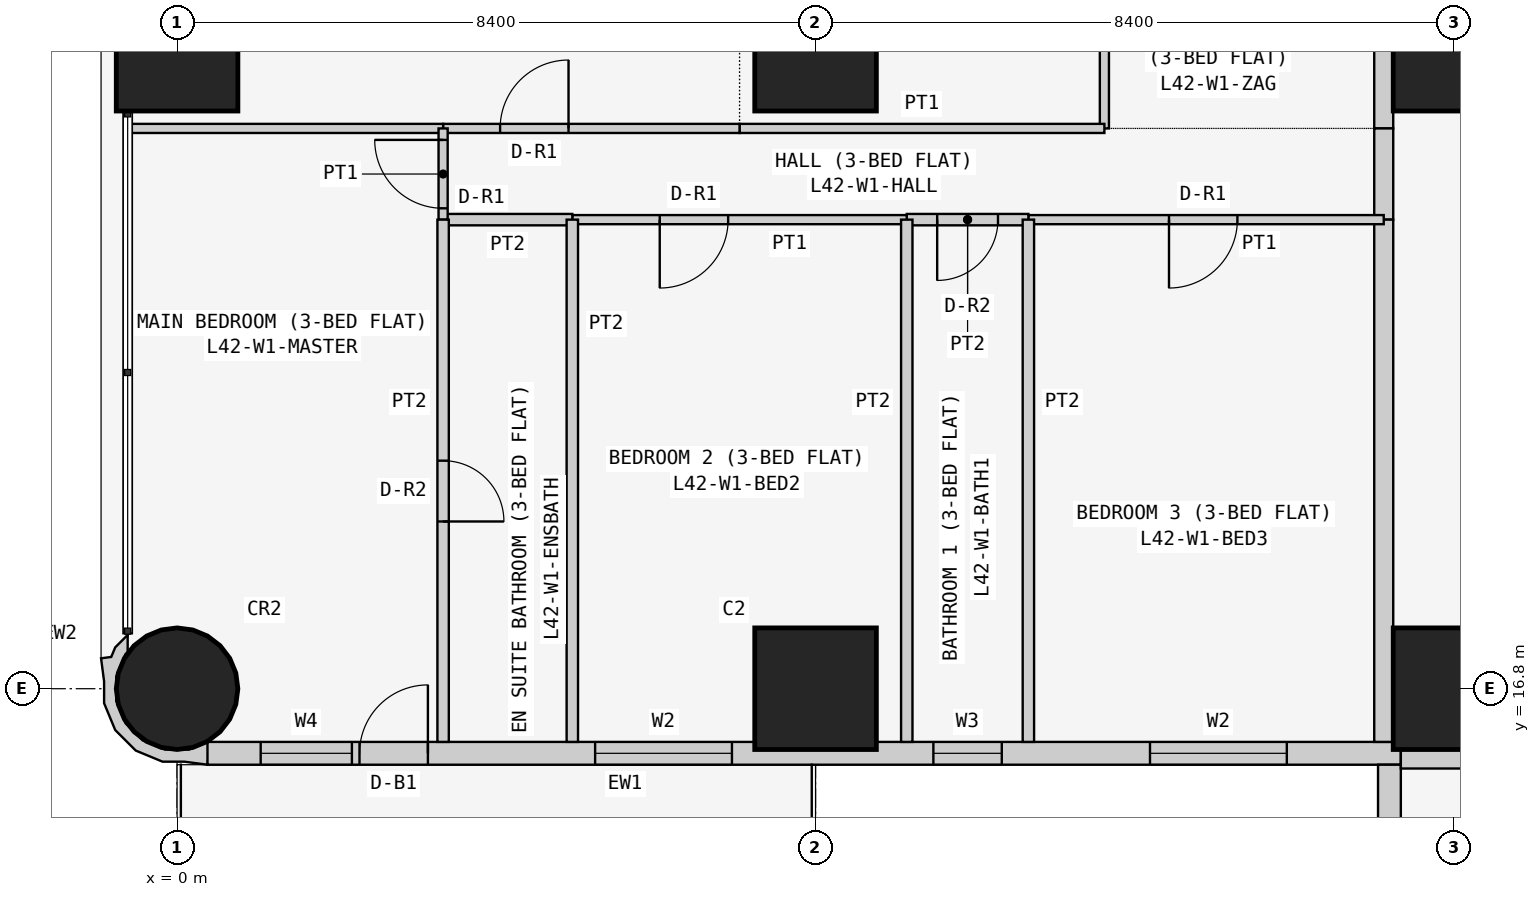
"""IFC4 building model, lengths in metres.
Left out: names, types, materials, properties, quantities, classifications, styles, units other than length and angle.
Written with IfcOpenShell. Run it as: python <this file> out.ifc"""

import sys

from ifc_helpers import new_model, si_unit, direction, frame, frame_2d, origin, origin_2d, place, context, subcontext, project, spatial, polyline, rectangle, circle, outline, extrude, element, fill, save


model = new_model("IFC4")
c1 = context("Model", 3, precision=1e-05, world=origin(), true_north=direction((0.0, 1.0)))
c2 = subcontext(c1, "Body", "Model", "MODEL_VIEW")
j1 = project(units=[si_unit("LENGTHUNIT", "METRE"), si_unit("PLANEANGLEUNIT", "RADIAN")], contexts=[c1])
p1 = place(None, origin())
s1 = spatial("IfcSite", under=j1, at=p1, CompositionType="ELEMENT")
p2 = place(p1, origin())
s2 = spatial("IfcBuilding", under=s1, at=p2, CompositionType="ELEMENT")
p3 = place(p2, frame((0.0, 0.0, 162.9)))
s3 = spatial("IfcBuildingStorey", under=s2, at=p3, CompositionType="ELEMENT", Elevation=162.9)
p4 = place(p3, frame((0.0, 16.8, 0.0), z_axis=(0.0, 0.0, 1.0), x_axis=(1.0, 0.0, 0.0)))
e1 = element("IfcColumn", 1, at=p4, inside=s3, PredefinedType="COLUMN", context=c2, shape_type="SweptSolid", body=[
    extrude(circle(Radius=0.8, at=origin_2d()), origin(), (0.0, 0.0, 1.0), 3.6),
])
for number, where, z_axis, x_axis in (
    (2, (0.0, 25.2, 0.0), (0.0, 0.0, 1.0), (1.0, 0.0, 0.0)),
    (3, (8.4, 16.8, 0.0), (0.0, 0.0, 1.0), (1.0, 0.0, 0.0)),
    (4, (8.4, 25.2, 0.0), (0.0, 0.0, 1.0), (1.0, 0.0, 0.0)),
    (5, (16.8, 16.8, 0.0), (0.0, 0.0, 1.0), (1.0, 0.0, 0.0)),
    (6, (16.8, 25.2, 0.0), (0.0, 0.0, 1.0), (1.0, 0.0, 0.0)),
):
    element("IfcColumn", number, at=place(p3, frame(where, z_axis=z_axis, x_axis=x_axis)), inside=s3, PredefinedType="COLUMN", context=c2, shape_type="SweptSolid", body=[
        extrude(rectangle(XDim=1.6, YDim=1.6, at=origin_2d()), origin(), (0.0, 0.0, 1.0), 3.6),
    ])
p5 = place(p3, frame((0.4, 15.95, 0.0), z_axis=(0.0, 0.0, 1.0), x_axis=(1.0, 0.0, 0.0)))
e7 = element("IfcWall", 7, at=p5, inside=s3, PredefinedType="SOLIDWALL", context=c2, shape_type="SweptSolid", body=[
    extrude(rectangle(XDim=15.7, YDim=0.3, at=frame_2d((7.85, 0.0))), origin(), (0.0, 0.0, 1.0), 3.45),
])
p6 = place(p5, frame((12.4, 0.0, 0.9)))
e8 = element("IfcOpeningElement", 8, at=p6, cuts=e7, PredefinedType="OPENING", context=c2, shape_type="SweptSolid", body=[
    extrude(rectangle(XDim=1.8, YDim=1.5, at=frame_2d((0.9, 0.75))), frame((0.0, 0.16, 0.0), z_axis=(0.0, -1.0, 0.0), x_axis=(1.0, 0.0, 0.0)), (0.0, 0.0, 1.0), 0.32),
])
p7 = place(p5, frame((9.55, 0.0, 1.5)))
e9 = element("IfcOpeningElement", 9, at=p7, cuts=e7, PredefinedType="OPENING", context=c2, shape_type="SweptSolid", body=[
    extrude(rectangle(XDim=0.9, YDim=0.7, at=frame_2d((0.45, 0.35))), frame((0.0, 0.16, 0.0), z_axis=(0.0, -1.0, 0.0), x_axis=(1.0, 0.0, 0.0)), (0.0, 0.0, 1.0), 0.32),
])
p8 = place(p5, frame((5.1, 0.0, 0.9)))
e10 = element("IfcOpeningElement", 10, at=p8, cuts=e7, PredefinedType="OPENING", context=c2, shape_type="SweptSolid", body=[
    extrude(rectangle(XDim=1.8, YDim=1.5, at=frame_2d((0.9, 0.75))), frame((0.0, 0.16, 0.0), z_axis=(0.0, -1.0, 0.0), x_axis=(1.0, 0.0, 0.0)), (0.0, 0.0, 1.0), 0.32),
])
p9 = place(p5, frame((2.0, 0.0, 0.0)))
e11 = element("IfcOpeningElement", 11, at=p9, cuts=e7, PredefinedType="OPENING", context=c2, shape_type="SweptSolid", body=[
    extrude(rectangle(XDim=0.9, YDim=2.4, at=frame_2d((0.45, 1.2))), frame((0.0, 0.16, 0.0), z_axis=(0.0, -1.0, 0.0), x_axis=(1.0, 0.0, 0.0)), (0.0, 0.0, 1.0), 0.32),
])
p10 = place(p5, frame((0.7, 0.0, 0.9)))
e12 = element("IfcOpeningElement", 12, at=p10, cuts=e7, PredefinedType="OPENING", context=c2, shape_type="SweptSolid", body=[
    extrude(rectangle(XDim=1.2, YDim=1.5, at=frame_2d((0.6, 0.75))), frame((0.0, 0.16, 0.0), z_axis=(0.0, -1.0, 0.0), x_axis=(1.0, 0.0, 0.0)), (0.0, 0.0, 1.0), 0.32),
])
p11 = place(p3, frame((15.95, 15.8, 0.0), z_axis=(0.0, 0.0, 1.0), x_axis=(0.0, -1.0, 0.0)))
e13 = element("IfcWall", 13, at=p11, inside=s3, PredefinedType="SOLIDWALL", context=c2, shape_type="SweptSolid", body=[
    extrude(rectangle(XDim=7.0, YDim=0.3, at=frame_2d((3.5, 0.0))), origin(), (0.0, 0.0, 1.0), 3.45),
])
p12 = place(p11, frame((1.5, 0.0, 0.9)))
e14 = element("IfcOpeningElement", 14, at=p12, cuts=e13, PredefinedType="OPENING", context=c2, shape_type="SweptSolid", body=[
    extrude(rectangle(XDim=2.4, YDim=1.5, at=frame_2d((1.2, 0.75))), frame((0.0, 0.16, 0.0), z_axis=(0.0, -1.0, 0.0), x_axis=(1.0, 0.0, 0.0)), (0.0, 0.0, 1.0), 0.32),
])
p13 = place(p11, frame((5.05, 0.0, 0.9)))
e15 = element("IfcOpeningElement", 15, at=p13, cuts=e13, PredefinedType="OPENING", context=c2, shape_type="SweptSolid", body=[
    extrude(rectangle(XDim=1.2, YDim=1.5, at=frame_2d((0.6, 0.75))), frame((0.0, 0.16, 0.0), z_axis=(0.0, -1.0, 0.0), x_axis=(1.0, 0.0, 0.0)), (0.0, 0.0, 1.0), 0.32),
])
p14 = place(p3, frame((-0.595, 17.448, 0.0), z_axis=(0.0, 0.0, 1.0), x_axis=(-0.93923434088, -0.343276641956, 0.0)))
e16 = element("IfcWall", 16, at=p14, inside=s3, PredefinedType="SOLIDWALL", context=c2, shape_type="SweptSolid", body=[
    extrude(outline(polyline([(-0.369, 1.89), (-0.509, 1.621), (-0.491, 1.614), (-0.479, 1.609), (-0.211, 1.62), (0.088, 1.511), (0.323, 1.295), (0.457, 1.006), (0.47, 0.688), (0.361, 0.389), (0.146, 0.154), (0.108, 0.137), (0.031, -0.075), (0.241, 0.023), (0.334, 0.124), (0.465, 0.094), (0.532, 0.393), (0.631, 0.663), (0.614, 1.045), (0.453, 1.391), (0.172, 1.649), (-0.098, 1.748), (-0.369, 1.89)])), origin(), (0.0, 0.0, 1.0), 3.45),
])
p15 = place(p3, frame((22.571, 15.875, 0.0), z_axis=(0.0, 0.0, 1.0), x_axis=(-1.0, 0.0, 0.0)))
e17 = element("IfcWall", 17, at=p15, inside=s3, PredefinedType="PARTITIONING", context=c2, shape_type="SweptSolid", body=[
    extrude(rectangle(XDim=6.471, YDim=0.25, at=frame_2d((3.235, 0.0))), origin(), (0.0, 0.0, 1.0), 3.45),
])
p16 = place(p3, frame((15.875, 24.171, 0.0), z_axis=(0.0, 0.0, 1.0), x_axis=(0.0, 1.0, 0.0)))
e18 = element("IfcWall", 18, at=p16, inside=s3, PredefinedType="PARTITIONING", context=c2, shape_type="SweptSolid", body=[
    extrude(rectangle(XDim=5.229, YDim=0.25, at=frame_2d((2.615, 0.0))), origin(), (0.0, 0.0, 1.0), 3.45),
])
p17 = place(p16, frame((2.129, 0.0, 0.0)))
e19 = element("IfcOpeningElement", 19, at=p17, cuts=e18, PredefinedType="OPENING", context=c2, shape_type="SweptSolid", body=[
    extrude(rectangle(XDim=1.0, YDim=2.1, at=frame_2d((0.5, 1.05))), frame((0.0, 0.135, 0.0), z_axis=(0.0, -1.0, 0.0), x_axis=(1.0, 0.0, 0.0)), (0.0, 0.0, 1.0), 0.27),
])
p18 = place(p3, frame((15.875, 22.971, 0.0), z_axis=(0.0, 0.0, 1.0), x_axis=(0.0, 1.0, 0.0)))
e20 = element("IfcWall", 20, at=p18, inside=s3, PredefinedType="PARTITIONING", context=c2, shape_type="SweptSolid", body=[
    extrude(rectangle(XDim=1.2, YDim=0.25, at=frame_2d((0.6, 0.0))), origin(), (0.0, 0.0, 1.0), 3.45),
])
p19 = place(p3, frame((15.875, 16.1, 0.0), z_axis=(0.0, 0.0, 1.0), x_axis=(0.0, 1.0, 0.0)))
e21 = element("IfcWall", 21, at=p19, inside=s3, PredefinedType="PARTITIONING", context=c2, shape_type="SweptSolid", body=[
    extrude(rectangle(XDim=6.871, YDim=0.25, at=frame_2d((3.436, 0.0))), origin(), (0.0, 0.0, 1.0), 3.45),
])
p20 = place(p3, frame((12.2, 29.4, 0.0), z_axis=(0.0, 0.0, 1.0), x_axis=(0.0, -1.0, 0.0)))
e22 = element("IfcWall", 22, at=p20, inside=s3, PredefinedType="PARTITIONING", context=c2, shape_type="SweptSolid", body=[
    extrude(rectangle(XDim=5.229, YDim=0.12, at=frame_2d((2.615, 0.0))), origin(), (0.0, 0.0, 1.0), 3.45),
])
p21 = place(p20, frame((1.05, 0.0, 0.0)))
e23 = element("IfcOpeningElement", 23, at=p21, cuts=e22, PredefinedType="OPENING", context=c2, shape_type="SweptSolid", body=[
    extrude(rectangle(XDim=0.9, YDim=2.1, at=frame_2d((0.45, 1.05))), frame((0.0, 0.07, 0.0), z_axis=(0.0, -1.0, 0.0), x_axis=(1.0, 0.0, 0.0)), (0.0, 0.0, 1.0), 0.14),
])
p22 = place(p3, frame((7.4, 24.171, 0.0), z_axis=(0.0, 0.0, 1.0), x_axis=(1.0, 0.0, 0.0)))
e24 = element("IfcWall", 24, at=p22, inside=s3, PredefinedType="PARTITIONING", context=c2, shape_type="SweptSolid", body=[
    extrude(rectangle(XDim=4.8, YDim=0.12, at=frame_2d((2.4, 0.0))), origin(), (0.0, 0.0, 1.0), 3.45),
])
p23 = place(p3, frame((3.5, 24.171, 0.0), z_axis=(0.0, 0.0, 1.0), x_axis=(1.0, 0.0, 0.0)))
e25 = element("IfcWall", 25, at=p23, inside=s3, PredefinedType="PARTITIONING", context=c2, shape_type="SweptSolid", body=[
    extrude(rectangle(XDim=3.9, YDim=0.12, at=frame_2d((1.95, 0.0))), origin(), (0.0, 0.0, 1.0), 3.45),
])
p24 = place(p23, frame((0.75, 0.0, 0.0)))
e26 = element("IfcOpeningElement", 26, at=p24, cuts=e25, PredefinedType="OPENING", context=c2, shape_type="SweptSolid", body=[
    extrude(rectangle(XDim=0.9, YDim=2.1, at=frame_2d((0.45, 1.05))), frame((0.0, 0.07, 0.0), z_axis=(0.0, -1.0, 0.0), x_axis=(1.0, 0.0, 0.0)), (0.0, 0.0, 1.0), 0.14),
])
p25 = place(p3, frame((-0.65, 24.171, 0.0), z_axis=(0.0, 0.0, 1.0), x_axis=(1.0, 0.0, 0.0)))
e27 = element("IfcWall", 27, at=p25, inside=s3, PredefinedType="PARTITIONING", context=c2, shape_type="SweptSolid", body=[
    extrude(rectangle(XDim=4.15, YDim=0.12, at=frame_2d((2.075, 0.0))), origin(), (0.0, 0.0, 1.0), 3.45),
])
p26 = place(p3, frame((11.2, 22.971, 0.0), z_axis=(0.0, 0.0, 1.0), x_axis=(1.0, 0.0, 0.0)))
e28 = element("IfcWall", 28, at=p26, inside=s3, PredefinedType="PARTITIONING", context=c2, shape_type="SweptSolid", body=[
    extrude(rectangle(XDim=4.675, YDim=0.12, at=frame_2d((2.337, 0.0))), origin(), (0.0, 0.0, 1.0), 3.45),
])
p27 = place(p26, frame((1.85, 0.0, 0.0)))
e29 = element("IfcOpeningElement", 29, at=p27, cuts=e28, PredefinedType="OPENING", context=c2, shape_type="SweptSolid", body=[
    extrude(rectangle(XDim=0.9, YDim=2.1, at=frame_2d((0.45, 1.05))), frame((0.0, 0.07, 0.0), z_axis=(0.0, -1.0, 0.0), x_axis=(1.0, 0.0, 0.0)), (0.0, 0.0, 1.0), 0.14),
])
p28 = place(p3, frame((9.6, 22.971, 0.0), z_axis=(0.0, 0.0, 1.0), x_axis=(1.0, 0.0, 0.0)))
e30 = element("IfcWall", 30, at=p28, inside=s3, PredefinedType="PARTITIONING", context=c2, shape_type="SweptSolid", body=[
    extrude(rectangle(XDim=1.6, YDim=0.15, at=frame_2d((0.8, 0.0))), origin(), (0.0, 0.0, 1.0), 3.45),
])
p29 = place(p28, frame((0.4, 0.0, 0.0)))
e31 = element("IfcOpeningElement", 31, at=p29, cuts=e30, PredefinedType="OPENING", context=c2, shape_type="SweptSolid", body=[
    extrude(rectangle(XDim=0.8, YDim=2.1, at=frame_2d((0.4, 1.05))), frame((0.0, 0.085, 0.0), z_axis=(0.0, -1.0, 0.0), x_axis=(1.0, 0.0, 0.0)), (0.0, 0.0, 1.0), 0.17),
])
p30 = place(p3, frame((5.2, 22.971, 0.0), z_axis=(0.0, 0.0, 1.0), x_axis=(1.0, 0.0, 0.0)))
e32 = element("IfcWall", 32, at=p30, inside=s3, PredefinedType="PARTITIONING", context=c2, shape_type="SweptSolid", body=[
    extrude(rectangle(XDim=4.4, YDim=0.12, at=frame_2d((2.2, 0.0))), origin(), (0.0, 0.0, 1.0), 3.45),
])
p31 = place(p30, frame((1.15, 0.0, 0.0)))
e33 = element("IfcOpeningElement", 33, at=p31, cuts=e32, PredefinedType="OPENING", context=c2, shape_type="SweptSolid", body=[
    extrude(rectangle(XDim=0.9, YDim=2.1, at=frame_2d((0.45, 1.05))), frame((0.0, 0.07, 0.0), z_axis=(0.0, -1.0, 0.0), x_axis=(1.0, 0.0, 0.0)), (0.0, 0.0, 1.0), 0.14),
])
p32 = place(p3, frame((3.5, 22.971, 0.0), z_axis=(0.0, 0.0, 1.0), x_axis=(1.0, 0.0, 0.0)))
e34 = element("IfcWall", 34, at=p32, inside=s3, PredefinedType="PARTITIONING", context=c2, shape_type="SweptSolid", body=[
    extrude(rectangle(XDim=1.7, YDim=0.15, at=frame_2d((0.85, 0.0))), origin(), (0.0, 0.0, 1.0), 3.45),
])
p33 = place(p3, frame((3.5, 24.171, 0.0), z_axis=(0.0, 0.0, 1.0), x_axis=(0.0, -1.0, 0.0)))
e35 = element("IfcWall", 35, at=p33, inside=s3, PredefinedType="PARTITIONING", context=c2, shape_type="SweptSolid", body=[
    extrude(rectangle(XDim=1.2, YDim=0.12, at=frame_2d((0.6, 0.0))), origin(), (0.0, 0.0, 1.0), 3.45),
])
p34 = place(p33, frame((0.151, 0.0, 0.0)))
e36 = element("IfcOpeningElement", 36, at=p34, cuts=e35, PredefinedType="OPENING", context=c2, shape_type="SweptSolid", body=[
    extrude(rectangle(XDim=0.9, YDim=2.1, at=frame_2d((0.45, 1.05))), frame((0.0, 0.07, 0.0), z_axis=(0.0, -1.0, 0.0), x_axis=(1.0, 0.0, 0.0)), (0.0, 0.0, 1.0), 0.14),
])
for number, where, z_axis, x_axis in (
    (37, (11.2, 22.971, 0.0), (0.0, 0.0, 1.0), (0.0, -1.0, 0.0)),
    (38, (9.6, 22.971, 0.0), (0.0, 0.0, 1.0), (0.0, -1.0, 0.0)),
    (39, (5.2, 22.971, 0.0), (0.0, 0.0, 1.0), (0.0, -1.0, 0.0)),
):
    element("IfcWall", number, at=place(p3, frame(where, z_axis=z_axis, x_axis=x_axis)), inside=s3, PredefinedType="PARTITIONING", context=c2, shape_type="SweptSolid", body=[
        extrude(rectangle(XDim=6.871, YDim=0.15, at=frame_2d((3.436, 0.0))), origin(), (0.0, 0.0, 1.0), 3.45),
    ])
p35 = place(p3, frame((3.5, 22.971, 0.0), z_axis=(0.0, 0.0, 1.0), x_axis=(0.0, -1.0, 0.0)))
e40 = element("IfcWall", 40, at=p35, inside=s3, PredefinedType="PARTITIONING", context=c2, shape_type="SweptSolid", body=[
    extrude(rectangle(XDim=6.871, YDim=0.15, at=frame_2d((3.436, 0.0))), origin(), (0.0, 0.0, 1.0), 3.45),
])
p36 = place(p35, frame((3.171, 0.0, 0.0)))
e41 = element("IfcOpeningElement", 41, at=p36, cuts=e40, PredefinedType="OPENING", context=c2, shape_type="SweptSolid", body=[
    extrude(rectangle(XDim=0.8, YDim=2.1, at=frame_2d((0.4, 1.05))), frame((0.0, 0.085, 0.0), z_axis=(0.0, -1.0, 0.0), x_axis=(1.0, 0.0, 0.0)), (0.0, 0.0, 1.0), 0.17),
])
p37 = place(p6, origin())
e42 = element("IfcWindow", 42, at=p37, inside=s3, PartitioningType="SINGLE_PANEL", PredefinedType="WINDOW", context=c2, shape_type="SweptSolid", body=[
    extrude(rectangle(XDim=1.8, YDim=1.5, at=frame_2d((0.9, 0.75))), frame((0.0, 0.03, 0.0), z_axis=(0.0, -1.0, 0.0), x_axis=(1.0, 0.0, 0.0)), (0.0, 0.0, 1.0), 0.06),
])
fill(e8, e42)
p38 = place(p7, origin())
e43 = element("IfcWindow", 43, at=p38, inside=s3, PartitioningType="SINGLE_PANEL", PredefinedType="WINDOW", context=c2, shape_type="SweptSolid", body=[
    extrude(rectangle(XDim=0.9, YDim=0.7, at=frame_2d((0.45, 0.35))), frame((0.0, 0.03, 0.0), z_axis=(0.0, -1.0, 0.0), x_axis=(1.0, 0.0, 0.0)), (0.0, 0.0, 1.0), 0.06),
])
fill(e9, e43)
p39 = place(p8, origin())
e44 = element("IfcWindow", 44, at=p39, inside=s3, PartitioningType="SINGLE_PANEL", PredefinedType="WINDOW", context=c2, shape_type="SweptSolid", body=[
    extrude(rectangle(XDim=1.8, YDim=1.5, at=frame_2d((0.9, 0.75))), frame((0.0, 0.03, 0.0), z_axis=(0.0, -1.0, 0.0), x_axis=(1.0, 0.0, 0.0)), (0.0, 0.0, 1.0), 0.06),
])
fill(e10, e44)
p40 = place(p9, origin())
e45 = element("IfcDoor", 45, at=p40, inside=s3, OperationType="SINGLE_SWING_RIGHT", PredefinedType="DOOR", context=c2, shape_type="SweptSolid", body=[
    extrude(rectangle(XDim=0.9, YDim=2.4, at=frame_2d((0.45, 1.2))), frame((0.0, 0.025, 0.0), z_axis=(0.0, -1.0, 0.0), x_axis=(1.0, 0.0, 0.0)), (0.0, 0.0, 1.0), 0.05),
])
fill(e11, e45)
p41 = place(p10, origin())
e46 = element("IfcWindow", 46, at=p41, inside=s3, PartitioningType="SINGLE_PANEL", PredefinedType="WINDOW", context=c2, shape_type="SweptSolid", body=[
    extrude(rectangle(XDim=1.2, YDim=1.5, at=frame_2d((0.6, 0.75))), frame((0.0, 0.03, 0.0), z_axis=(0.0, -1.0, 0.0), x_axis=(1.0, 0.0, 0.0)), (0.0, 0.0, 1.0), 0.06),
])
fill(e12, e46)
p42 = place(p24, origin())
e47 = element("IfcDoor", 47, at=p42, inside=s3, OperationType="SINGLE_SWING_RIGHT", PredefinedType="DOOR", context=c2, shape_type="SweptSolid", body=[
    extrude(rectangle(XDim=0.9, YDim=2.1, at=frame_2d((0.45, 1.05))), frame((0.0, 0.025, 0.0), z_axis=(0.0, -1.0, 0.0), x_axis=(1.0, 0.0, 0.0)), (0.0, 0.0, 1.0), 0.05),
])
fill(e26, e47)
p43 = place(p27, frame((0.9, 0.0, 0.0), z_axis=(0.0, 0.0, 1.0), x_axis=(-1.0, 0.0, 0.0)))
e48 = element("IfcDoor", 48, at=p43, inside=s3, OperationType="SINGLE_SWING_RIGHT", PredefinedType="DOOR", context=c2, shape_type="SweptSolid", body=[
    extrude(rectangle(XDim=0.9, YDim=2.1, at=frame_2d((0.45, 1.05))), frame((0.0, 0.025, 0.0), z_axis=(0.0, -1.0, 0.0), x_axis=(1.0, 0.0, 0.0)), (0.0, 0.0, 1.0), 0.05),
])
fill(e29, e48)
p44 = place(p29, frame((0.8, 0.0, 0.0), z_axis=(0.0, 0.0, 1.0), x_axis=(-1.0, 0.0, 0.0)))
e49 = element("IfcDoor", 49, at=p44, inside=s3, OperationType="SINGLE_SWING_RIGHT", PredefinedType="DOOR", context=c2, shape_type="SweptSolid", body=[
    extrude(rectangle(XDim=0.8, YDim=2.1, at=frame_2d((0.4, 1.05))), frame((0.0, 0.025, 0.0), z_axis=(0.0, -1.0, 0.0), x_axis=(1.0, 0.0, 0.0)), (0.0, 0.0, 1.0), 0.05),
])
fill(e31, e49)
p45 = place(p31, frame((0.9, 0.0, 0.0), z_axis=(0.0, 0.0, 1.0), x_axis=(-1.0, 0.0, 0.0)))
e50 = element("IfcDoor", 50, at=p45, inside=s3, OperationType="SINGLE_SWING_RIGHT", PredefinedType="DOOR", context=c2, shape_type="SweptSolid", body=[
    extrude(rectangle(XDim=0.9, YDim=2.1, at=frame_2d((0.45, 1.05))), frame((0.0, 0.025, 0.0), z_axis=(0.0, -1.0, 0.0), x_axis=(1.0, 0.0, 0.0)), (0.0, 0.0, 1.0), 0.05),
])
fill(e33, e50)
p46 = place(p34, frame((0.9, 0.0, 0.0), z_axis=(0.0, 0.0, 1.0), x_axis=(-1.0, 0.0, 0.0)))
e51 = element("IfcDoor", 51, at=p46, inside=s3, OperationType="SINGLE_SWING_RIGHT", PredefinedType="DOOR", context=c2, shape_type="SweptSolid", body=[
    extrude(rectangle(XDim=0.9, YDim=2.1, at=frame_2d((0.45, 1.05))), frame((0.0, 0.025, 0.0), z_axis=(0.0, -1.0, 0.0), x_axis=(1.0, 0.0, 0.0)), (0.0, 0.0, 1.0), 0.05),
])
fill(e36, e51)
p47 = place(p36, origin())
e52 = element("IfcDoor", 52, at=p47, inside=s3, OperationType="SINGLE_SWING_RIGHT", PredefinedType="DOOR", context=c2, shape_type="SweptSolid", body=[
    extrude(rectangle(XDim=0.8, YDim=2.1, at=frame_2d((0.4, 1.05))), frame((0.0, 0.025, 0.0), z_axis=(0.0, -1.0, 0.0), x_axis=(1.0, 0.0, 0.0)), (0.0, 0.0, 1.0), 0.05),
])
fill(e41, e52)
save(model, sys.argv[1])
